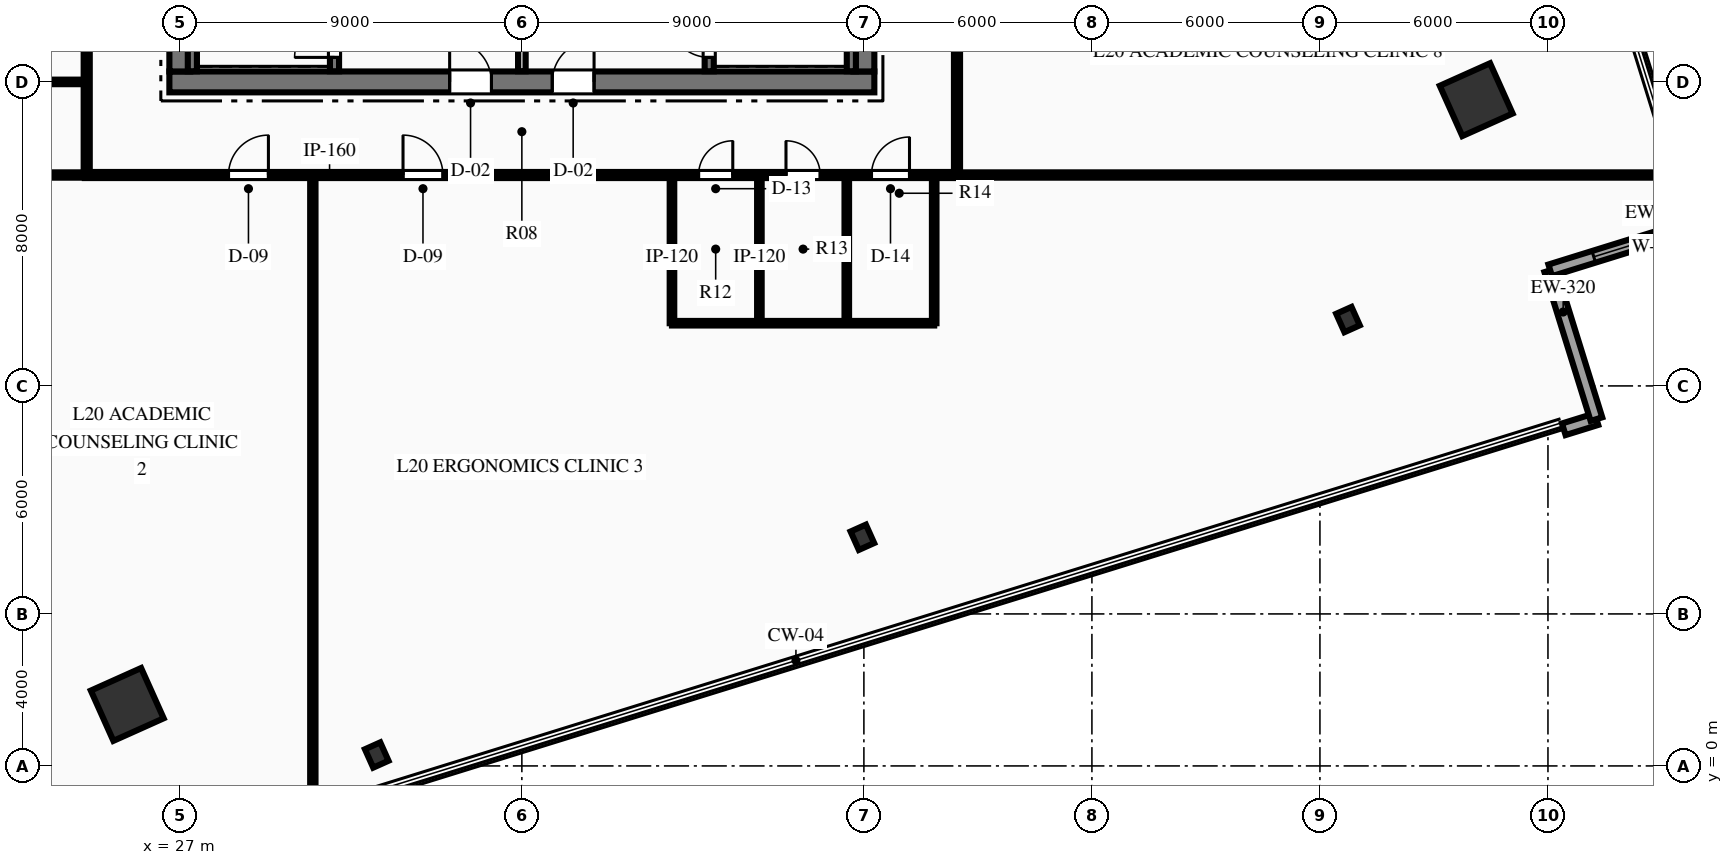
"""IFC4 building model, lengths in metres.
Left out: names, types, materials, properties, quantities, classifications, styles, units other than length and angle.
Written with IfcOpenShell. Run it as: python <this file> out.ifc"""

import sys

from ifc_helpers import new_model, si_unit, direction, frame, frame_2d, origin, origin_2d, place, context, subcontext, project, spatial, rectangle, hollow_rectangle, i_section, extrude, element, fill, save


model = new_model("IFC4")
c1 = context("Model", 3, precision=1e-05, world=origin(), true_north=direction((0.0, 1.0)))
c2 = subcontext(c1, "Body", "Model", "MODEL_VIEW")
j1 = project(units=[si_unit("LENGTHUNIT", "METRE"), si_unit("PLANEANGLEUNIT", "RADIAN")], contexts=[c1])
p1 = place(None, origin())
s1 = spatial("IfcSite", under=j1, at=p1, CompositionType="ELEMENT")
p2 = place(p1, origin())
s2 = spatial("IfcBuilding", under=s1, at=p2, CompositionType="ELEMENT")
p3 = place(p2, frame((0.0, 0.0, 85.95)))
s3 = spatial("IfcBuildingStorey", under=s2, at=p3, CompositionType="ELEMENT", Elevation=85.95)
p4 = place(p3, frame((26.725, 18.0, 0.0), z_axis=(0.0, 0.0, 1.0), x_axis=(1.0, 0.0, 0.0)))
e1 = element("IfcWall", 1, at=p4, inside=s3, PredefinedType="SHEAR", context=c2, shape_type="SweptSolid", body=[
    extrude(rectangle(XDim=18.55, YDim=0.55, at=frame_2d((9.275, 0.0))), origin(), (0.0, 0.0, 1.0), 4.5),
])
p5 = place(p4, frame((7.375, 0.0, 0.0)))
e2 = element("IfcOpeningElement", 2, at=p5, cuts=e1, PredefinedType="OPENING", context=c2, shape_type="SweptSolid", body=[
    extrude(rectangle(XDim=1.1, YDim=2.15, at=frame_2d((0.55, 1.075))), frame((0.0, 0.285, 0.0), z_axis=(0.0, -1.0, 0.0), x_axis=(1.0, 0.0, 0.0)), (0.0, 0.0, 1.0), 0.57),
])
p6 = place(p4, frame((10.075, 0.0, 0.0)))
e3 = element("IfcOpeningElement", 3, at=p6, cuts=e1, PredefinedType="OPENING", context=c2, shape_type="SweptSolid", body=[
    extrude(rectangle(XDim=1.1, YDim=2.15, at=frame_2d((0.55, 1.075))), frame((0.0, 0.285, 0.0), z_axis=(0.0, -1.0, 0.0), x_axis=(1.0, 0.0, 0.0)), (0.0, 0.0, 1.0), 0.57),
])
p7 = place(p3, frame((27.0, 18.275, 0.0), z_axis=(0.0, 0.0, 1.0), x_axis=(0.0, 1.0, 0.0)))
e4 = element("IfcWall", 4, at=p7, inside=s3, PredefinedType="SHEAR", context=c2, shape_type="SweptSolid", body=[
    extrude(rectangle(XDim=15.45, YDim=0.55, at=frame_2d((7.725, 0.0))), origin(), (0.0, 0.0, 1.0), 4.5),
])
p8 = place(p7, frame((9.965, 0.0, 0.0)))
e5 = element("IfcOpeningElement", 5, at=p8, cuts=e4, PredefinedType="OPENING", context=c2, shape_type="SweptSolid", body=[
    extrude(rectangle(XDim=1.4, YDim=2.2, at=frame_2d((0.7, 1.1))), frame((0.0, 0.285, 0.0), z_axis=(0.0, -1.0, 0.0), x_axis=(1.0, 0.0, 0.0)), (0.0, 0.0, 1.0), 0.57),
])
p9 = place(p3, frame((45.0, 18.275, 0.0), z_axis=(0.0, 0.0, 1.0), x_axis=(0.0, 1.0, 0.0)))
e6 = element("IfcWall", 6, at=p9, inside=s3, PredefinedType="SHEAR", context=c2, shape_type="SweptSolid", body=[
    extrude(rectangle(XDim=15.45, YDim=0.55, at=frame_2d((7.725, 0.0))), origin(), (0.0, 0.0, 1.0), 4.5),
])
p10 = place(p9, frame((9.965, 0.0, 0.0)))
e7 = element("IfcOpeningElement", 7, at=p10, cuts=e6, PredefinedType="OPENING", context=c2, shape_type="SweptSolid", body=[
    extrude(rectangle(XDim=1.4, YDim=2.2, at=frame_2d((0.7, 1.1))), frame((0.0, 0.285, 0.0), z_axis=(0.0, -1.0, 0.0), x_axis=(1.0, 0.0, 0.0)), (0.0, 0.0, 1.0), 0.57),
])
p11 = place(p3, frame((31.07, 18.28, 0.0), z_axis=(0.0, 0.0, 1.0), x_axis=(0.0, 1.0, 0.0)))
e8 = element("IfcWall", 8, at=p11, inside=s3, PredefinedType="SHEAR", context=c2, shape_type="SweptSolid", body=[
    extrude(rectangle(XDim=8.26, YDim=0.24, at=frame_2d((4.13, 0.0))), origin(), (0.0, 0.0, 1.0), 4.5),
])
p12 = place(p11, frame((0.365, 0.0, 0.0)))
e9 = element("IfcOpeningElement", 9, at=p12, cuts=e8, PredefinedType="OPENING", context=c2, shape_type="SweptSolid", body=[
    extrude(rectangle(XDim=1.05, YDim=2.15, at=frame_2d((0.525, 1.075))), frame((0.0, 0.13, 0.0), z_axis=(0.0, -1.0, 0.0), x_axis=(1.0, 0.0, 0.0)), (0.0, 0.0, 1.0), 0.26),
])
p13 = place(p3, frame((27.33, 18.28, 0.0), z_axis=(0.0, 0.0, 1.0), x_axis=(0.0, 1.0, 0.0)))
e10 = element("IfcWall", 10, at=p13, inside=s3, PredefinedType="SHEAR", context=c2, shape_type="SweptSolid", body=[
    extrude(rectangle(XDim=8.26, YDim=0.24, at=frame_2d((4.13, 0.0))), origin(), (0.0, 0.0, 1.0), 4.5),
])
p14 = place(p3, frame((40.93, 18.28, 0.0), z_axis=(0.0, 0.0, 1.0), x_axis=(0.0, 1.0, 0.0)))
e11 = element("IfcWall", 11, at=p14, inside=s3, PredefinedType="SHEAR", context=c2, shape_type="SweptSolid", body=[
    extrude(rectangle(XDim=8.26, YDim=0.24, at=frame_2d((4.13, 0.0))), origin(), (0.0, 0.0, 1.0), 4.5),
])
p15 = place(p14, frame((0.365, 0.0, 0.0)))
e12 = element("IfcOpeningElement", 12, at=p15, cuts=e11, PredefinedType="OPENING", context=c2, shape_type="SweptSolid", body=[
    extrude(rectangle(XDim=1.05, YDim=2.15, at=frame_2d((0.525, 1.075))), frame((0.0, 0.13, 0.0), z_axis=(0.0, -1.0, 0.0), x_axis=(1.0, 0.0, 0.0)), (0.0, 0.0, 1.0), 0.26),
])
p16 = place(p3, frame((44.67, 18.28, 0.0), z_axis=(0.0, 0.0, 1.0), x_axis=(0.0, 1.0, 0.0)))
e13 = element("IfcWall", 13, at=p16, inside=s3, PredefinedType="SHEAR", context=c2, shape_type="SweptSolid", body=[
    extrude(rectangle(XDim=8.26, YDim=0.24, at=frame_2d((4.13, 0.0))), origin(), (0.0, 0.0, 1.0), 4.5),
])
for number, where, z_axis, x_axis in (
    (14, (25.617, 1.618, 0.0), (0.0, 0.0, 1.0), (0.912, 0.409, 0.0)),
    (15, (61.112, 17.533, 0.0), (0.0, 0.0, 1.0), (0.912, 0.409, 0.0)),
):
    element("IfcColumn", number, at=place(p3, frame(where, z_axis=z_axis, x_axis=x_axis)), inside=s3, PredefinedType="COLUMN", context=c2, shape_type="SweptSolid", body=[
        extrude(hollow_rectangle(XDim=1.45, YDim=1.45, WallThickness=0.07, at=origin_2d()), origin(), (0.0, 0.0, 1.0), 4.5),
    ])
for number, where, z_axis, x_axis in (
    (16, (32.181, 0.287, 0.0), (0.0, 0.0, 1.0), (0.912, 0.409, 0.0)),
    (17, (44.96, 6.017, 0.0), (0.0, 0.0, 1.0), (0.912, 0.409, 0.0)),
    (18, (57.738, 11.746, 0.0), (0.0, 0.0, 1.0), (0.912, 0.409, 0.0)),
):
    element("IfcColumn", number, at=place(p3, frame(where, z_axis=z_axis, x_axis=x_axis)), inside=s3, PredefinedType="COLUMN", context=c2, shape_type="SweptSolid", body=[
        extrude(i_section(OverallWidth=0.442, OverallDepth=0.531, WebThickness=0.066, FlangeThickness=0.106, at=origin_2d()), origin(), (0.0, 0.0, 1.0), 4.5),
    ])
p17 = place(p3, frame((64.276, 9.126, 0.0), z_axis=(0.0, 0.0, 1.0), x_axis=(-0.954942240285, -0.296791707634, 0.0)))
e19 = element("IfcWall", 19, at=p17, inside=s3, PredefinedType="STANDARD", context=c2, shape_type="SweptSolid", body=[
    extrude(rectangle(XDim=0.9, YDim=0.32, at=frame_2d((0.45, 0.0))), origin(), (0.0, 0.0, 1.0), 4.2),
])
p18 = place(p3, frame((63.06, 13.042, 0.0), z_axis=(0.0, 0.0, 1.0), x_axis=(0.296545302379, -0.95501878706, 0.0)))
e20 = element("IfcWall", 20, at=p18, inside=s3, PredefinedType="STANDARD", context=c2, shape_type="SweptSolid", body=[
    extrude(rectangle(XDim=4.1, YDim=0.32, at=frame_2d((2.05, 0.0))), origin(), (0.0, 0.0, 1.0), 4.2),
])
p19 = place(p3, frame((66.976, 14.257, 0.0), z_axis=(0.0, 0.0, 1.0), x_axis=(-0.955024023145, -0.296528439134, 0.0)))
e21 = element("IfcWall", 21, at=p19, inside=s3, PredefinedType="STANDARD", context=c2, shape_type="SweptSolid", body=[
    extrude(rectangle(XDim=4.1, YDim=0.32, at=frame_2d((2.05, 0.0))), origin(), (0.0, 0.0, 1.0), 4.2),
])
p20 = place(p19, frame((1.2, 0.0, 0.75)))
e22 = element("IfcOpeningElement", 22, at=p20, cuts=e21, PredefinedType="OPENING", context=c2, shape_type="SweptSolid", body=[
    extrude(rectangle(XDim=1.7, YDim=2.5, at=frame_2d((0.85, 1.25))), frame((0.0, 0.17, 0.0), z_axis=(0.0, -1.0, 0.0), x_axis=(1.0, 0.0, 0.0)), (0.0, 0.0, 1.0), 0.34),
])
p21 = place(p3, frame((36.0, 18.28, 0.0), z_axis=(0.0, 0.0, 1.0), x_axis=(0.0, 1.0, 0.0)))
e23 = element("IfcWall", 23, at=p21, inside=s3, PredefinedType="PARTITIONING", context=c2, shape_type="SweptSolid", body=[
    extrude(rectangle(XDim=3.77, YDim=0.2, at=frame_2d((1.885, 0.0))), origin(), (0.0, 0.0, 1.0), 4.2),
])
p22 = place(p3, frame((24.5, 15.55, 0.0), z_axis=(0.0, 0.0, 1.0), x_axis=(1.0, 0.0, 0.0)))
e24 = element("IfcWall", 24, at=p22, inside=s3, PredefinedType="PARTITIONING", context=c2, shape_type="SweptSolid", body=[
    extrude(rectangle(XDim=23.0, YDim=0.16, at=frame_2d((11.5, 0.0))), origin(), (0.0, 0.0, 1.0), 4.2),
])
p23 = place(p22, frame((16.15, 0.0, 0.0)))
e25 = element("IfcOpeningElement", 25, at=p23, cuts=e24, PredefinedType="OPENING", context=c2, shape_type="SweptSolid", body=[
    extrude(rectangle(XDim=0.9, YDim=2.15, at=frame_2d((0.45, 1.075))), frame((0.0, 0.09, 0.0), z_axis=(0.0, -1.0, 0.0), x_axis=(1.0, 0.0, 0.0)), (0.0, 0.0, 1.0), 0.18),
])
p24 = place(p22, frame((18.45, 0.0, 0.0)))
e26 = element("IfcOpeningElement", 26, at=p24, cuts=e24, PredefinedType="OPENING", context=c2, shape_type="SweptSolid", body=[
    extrude(rectangle(XDim=0.9, YDim=2.15, at=frame_2d((0.45, 1.075))), frame((0.0, 0.09, 0.0), z_axis=(0.0, -1.0, 0.0), x_axis=(1.0, 0.0, 0.0)), (0.0, 0.0, 1.0), 0.18),
])
p25 = place(p22, frame((20.7, 0.0, 0.0)))
e27 = element("IfcOpeningElement", 27, at=p25, cuts=e24, PredefinedType="OPENING", context=c2, shape_type="SweptSolid", body=[
    extrude(rectangle(XDim=1.0, YDim=2.15, at=frame_2d((0.5, 1.075))), frame((0.0, 0.09, 0.0), z_axis=(0.0, -1.0, 0.0), x_axis=(1.0, 0.0, 0.0)), (0.0, 0.0, 1.0), 0.18),
])
p26 = place(p22, frame((3.781, 0.0, 0.0)))
e28 = element("IfcOpeningElement", 28, at=p26, cuts=e24, PredefinedType="OPENING", context=c2, shape_type="SweptSolid", body=[
    extrude(rectangle(XDim=1.05, YDim=2.15, at=frame_2d((0.525, 1.075))), frame((0.0, 0.09, 0.0), z_axis=(0.0, -1.0, 0.0), x_axis=(1.0, 0.0, 0.0)), (0.0, 0.0, 1.0), 0.18),
])
p27 = place(p22, frame((8.373, 0.0, 0.0)))
e29 = element("IfcOpeningElement", 29, at=p27, cuts=e24, PredefinedType="OPENING", context=c2, shape_type="SweptSolid", body=[
    extrude(rectangle(XDim=1.05, YDim=2.15, at=frame_2d((0.525, 1.075))), frame((0.0, 0.09, 0.0), z_axis=(0.0, -1.0, 0.0), x_axis=(1.0, 0.0, 0.0)), (0.0, 0.0, 1.0), 0.18),
])
p28 = place(p3, frame((24.55, 15.55, 0.0), z_axis=(0.0, 0.0, 1.0), x_axis=(0.0, 1.0, 0.0)))
e30 = element("IfcWall", 30, at=p28, inside=s3, PredefinedType="PARTITIONING", context=c2, shape_type="SweptSolid", body=[
    extrude(rectangle(XDim=20.9, YDim=0.16, at=frame_2d((10.45, 0.0))), origin(), (0.0, 0.0, 1.0), 4.2),
])
p29 = place(p28, frame((5.075, 0.0, 0.0)))
e31 = element("IfcOpeningElement", 31, at=p29, cuts=e30, PredefinedType="OPENING", context=c2, shape_type="SweptSolid", body=[
    extrude(rectangle(XDim=0.95, YDim=2.15, at=frame_2d((0.475, 1.075))), frame((0.0, 0.09, 0.0), z_axis=(0.0, -1.0, 0.0), x_axis=(1.0, 0.0, 0.0)), (0.0, 0.0, 1.0), 0.18),
])
p30 = place(p28, frame((12.524, 0.0, 0.0)))
e32 = element("IfcOpeningElement", 32, at=p30, cuts=e30, PredefinedType="OPENING", context=c2, shape_type="SweptSolid", body=[
    extrude(rectangle(XDim=1.05, YDim=2.15, at=frame_2d((0.525, 1.075))), frame((0.0, 0.09, 0.0), z_axis=(0.0, -1.0, 0.0), x_axis=(1.0, 0.0, 0.0)), (0.0, 0.0, 1.0), 0.18),
])
p31 = place(p3, frame((47.45, 15.55, 0.0), z_axis=(0.0, 0.0, 1.0), x_axis=(0.0, 1.0, 0.0)))
e33 = element("IfcWall", 33, at=p31, inside=s3, PredefinedType="PARTITIONING", context=c2, shape_type="SweptSolid", body=[
    extrude(rectangle(XDim=20.9, YDim=0.16, at=frame_2d((10.45, 0.0))), origin(), (0.0, 0.0, 1.0), 4.2),
])
p32 = place(p31, frame((4.087, 0.0, 0.0)))
e34 = element("IfcOpeningElement", 34, at=p32, cuts=e33, PredefinedType="OPENING", context=c2, shape_type="SweptSolid", body=[
    extrude(rectangle(XDim=1.05, YDim=2.15, at=frame_2d((0.525, 1.075))), frame((0.0, 0.09, 0.0), z_axis=(0.0, -1.0, 0.0), x_axis=(1.0, 0.0, 0.0)), (0.0, 0.0, 1.0), 0.18),
])
p33 = place(p31, frame((7.885, 0.0, 0.0)))
e35 = element("IfcOpeningElement", 35, at=p33, cuts=e33, PredefinedType="OPENING", context=c2, shape_type="SweptSolid", body=[
    extrude(rectangle(XDim=1.05, YDim=2.15, at=frame_2d((0.525, 1.075))), frame((0.0, 0.09, 0.0), z_axis=(0.0, -1.0, 0.0), x_axis=(1.0, 0.0, 0.0)), (0.0, 0.0, 1.0), 0.18),
])
p34 = place(p31, frame((14.743, 0.0, 0.0)))
e36 = element("IfcOpeningElement", 36, at=p34, cuts=e33, PredefinedType="OPENING", context=c2, shape_type="SweptSolid", body=[
    extrude(rectangle(XDim=1.05, YDim=2.15, at=frame_2d((0.525, 1.075))), frame((0.0, 0.09, 0.0), z_axis=(0.0, -1.0, 0.0), x_axis=(1.0, 0.0, 0.0)), (0.0, 0.0, 1.0), 0.18),
])
for number, where, z_axis, x_axis in (
    (37, (39.95, 11.65, 0.0), (0.0, 0.0, 1.0), (0.0, 1.0, 0.0)),
    (38, (42.25, 11.65, 0.0), (0.0, 0.0, 1.0), (0.0, 1.0, 0.0)),
    (39, (44.55, 11.65, 0.0), (0.0, 0.0, 1.0), (0.0, 1.0, 0.0)),
    (40, (46.85, 11.65, 0.0), (0.0, 0.0, 1.0), (0.0, 1.0, 0.0)),
):
    element("IfcWall", number, at=place(p3, frame(where, z_axis=z_axis, x_axis=x_axis)), inside=s3, PredefinedType="PARTITIONING", context=c2, shape_type="SweptSolid", body=[
        extrude(rectangle(XDim=3.9, YDim=0.12, at=frame_2d((1.95, 0.0))), origin(), (0.0, 0.0, 1.0), 4.2),
    ])
p35 = place(p3, frame((39.95, 11.65, 0.0), z_axis=(0.0, 0.0, 1.0), x_axis=(1.0, 0.0, 0.0)))
e41 = element("IfcWall", 41, at=p35, inside=s3, PredefinedType="PARTITIONING", context=c2, shape_type="SweptSolid", body=[
    extrude(rectangle(XDim=6.9, YDim=0.12, at=frame_2d((3.45, 0.0))), origin(), (0.0, 0.0, 1.0), 4.2),
])
p36 = place(p3, frame((11.958, 15.55, 0.0), z_axis=(0.0, 0.0, 1.0), x_axis=(1.0, 0.0, 0.0)))
e42 = element("IfcWall", 42, at=p36, inside=s3, PredefinedType="PARTITIONING", context=c2, shape_type="SweptSolid", body=[
    extrude(rectangle(XDim=12.593, YDim=0.14, at=frame_2d((6.296, 0.0))), origin(), (0.0, 0.0, 1.0), 4.2),
])
p37 = place(p36, frame((6.663, 0.0, 0.0)))
e43 = element("IfcOpeningElement", 43, at=p37, cuts=e42, PredefinedType="OPENING", context=c2, shape_type="SweptSolid", body=[
    extrude(rectangle(XDim=0.95, YDim=2.15, at=frame_2d((0.475, 1.075))), frame((0.0, 0.08, 0.0), z_axis=(0.0, -1.0, 0.0), x_axis=(1.0, 0.0, 0.0)), (0.0, 0.0, 1.0), 0.16),
])
p38 = place(p3, frame((47.45, 15.55, 0.0), z_axis=(0.0, 0.0, 1.0), x_axis=(1.0, 0.0, 0.0)))
e44 = element("IfcWall", 44, at=p38, inside=s3, PredefinedType="PARTITIONING", context=c2, shape_type="SweptSolid", body=[
    extrude(rectangle(XDim=19.082, YDim=0.14, at=frame_2d((9.541, 0.0))), origin(), (0.0, 0.0, 1.0), 4.2),
])
p39 = place(p3, frame((30.5, -1.32, 0.0), z_axis=(0.0, 0.0, 1.0), x_axis=(0.0, 1.0, 0.0)))
e45 = element("IfcWall", 45, at=p39, inside=s3, PredefinedType="PARTITIONING", context=c2, shape_type="SweptSolid", body=[
    extrude(rectangle(XDim=16.87, YDim=0.14, at=frame_2d((8.435, 0.0))), origin(), (0.0, 0.0, 1.0), 4.2),
])
p40 = place(p3, frame((20.2, 18.0, 0.0), z_axis=(0.0, 0.0, 1.0), x_axis=(1.0, 0.0, 0.0)))
e46 = element("IfcWall", 46, at=p40, inside=s3, PredefinedType="PARTITIONING", context=c2, shape_type="SweptSolid", body=[
    extrude(rectangle(XDim=4.35, YDim=0.12, at=frame_2d((2.175, 0.0))), origin(), (0.0, 0.0, 1.0), 3.499),
])
p41 = place(p20, origin())
e47 = element("IfcWindow", 47, at=p41, inside=s3, PartitioningType="SINGLE_PANEL", PredefinedType="WINDOW", context=c2, shape_type="SweptSolid", body=[
    extrude(rectangle(XDim=1.7, YDim=2.5, at=frame_2d((0.85, 1.25))), frame((0.0, 0.03, 0.0), z_axis=(0.0, -1.0, 0.0), x_axis=(1.0, 0.0, 0.0)), (0.0, 0.0, 1.0), 0.06),
])
fill(e22, e47)
p42 = place(p12, origin())
e48 = element("IfcDoor", 48, at=p42, inside=s3, OperationType="SINGLE_SWING_LEFT", PredefinedType="DOOR", context=c2, shape_type="SweptSolid", body=[
    extrude(rectangle(XDim=1.05, YDim=2.15, at=frame_2d((0.525, 1.075))), frame((0.0, 0.025, 0.0), z_axis=(0.0, -1.0, 0.0), x_axis=(1.0, 0.0, 0.0)), (0.0, 0.0, 1.0), 0.05),
])
fill(e9, e48)
p43 = place(p15, origin())
e49 = element("IfcDoor", 49, at=p43, inside=s3, OperationType="SINGLE_SWING_RIGHT", PredefinedType="DOOR", context=c2, shape_type="SweptSolid", body=[
    extrude(rectangle(XDim=1.05, YDim=2.15, at=frame_2d((0.525, 1.075))), frame((0.0, 0.025, 0.0), z_axis=(0.0, -1.0, 0.0), x_axis=(1.0, 0.0, 0.0)), (0.0, 0.0, 1.0), 0.05),
])
fill(e12, e49)
p44 = place(p5, origin())
e50 = element("IfcDoor", 50, at=p44, inside=s3, OperationType="SINGLE_SWING_LEFT", PredefinedType="DOOR", context=c2, shape_type="SweptSolid", body=[
    extrude(rectangle(XDim=1.1, YDim=2.15, at=frame_2d((0.55, 1.075))), frame((0.0, 0.025, 0.0), z_axis=(0.0, -1.0, 0.0), x_axis=(1.0, 0.0, 0.0)), (0.0, 0.0, 1.0), 0.05),
])
fill(e2, e50)
p45 = place(p6, origin())
e51 = element("IfcDoor", 51, at=p45, inside=s3, OperationType="SINGLE_SWING_RIGHT", PredefinedType="DOOR", context=c2, shape_type="SweptSolid", body=[
    extrude(rectangle(XDim=1.1, YDim=2.15, at=frame_2d((0.55, 1.075))), frame((0.0, 0.025, 0.0), z_axis=(0.0, -1.0, 0.0), x_axis=(1.0, 0.0, 0.0)), (0.0, 0.0, 1.0), 0.05),
])
fill(e3, e51)
p46 = place(p23, origin())
e52 = element("IfcDoor", 52, at=p46, inside=s3, OperationType="SINGLE_SWING_RIGHT", PredefinedType="DOOR", context=c2, shape_type="SweptSolid", body=[
    extrude(rectangle(XDim=0.9, YDim=2.15, at=frame_2d((0.45, 1.075))), frame((0.0, 0.025, 0.0), z_axis=(0.0, -1.0, 0.0), x_axis=(1.0, 0.0, 0.0)), (0.0, 0.0, 1.0), 0.05),
])
fill(e25, e52)
p47 = place(p24, origin())
e53 = element("IfcDoor", 53, at=p47, inside=s3, OperationType="SINGLE_SWING_LEFT", PredefinedType="DOOR", context=c2, shape_type="SweptSolid", body=[
    extrude(rectangle(XDim=0.9, YDim=2.15, at=frame_2d((0.45, 1.075))), frame((0.0, 0.025, 0.0), z_axis=(0.0, -1.0, 0.0), x_axis=(1.0, 0.0, 0.0)), (0.0, 0.0, 1.0), 0.05),
])
fill(e26, e53)
p48 = place(p25, origin())
e54 = element("IfcDoor", 54, at=p48, inside=s3, OperationType="SINGLE_SWING_RIGHT", PredefinedType="DOOR", context=c2, shape_type="SweptSolid", body=[
    extrude(rectangle(XDim=1.0, YDim=2.15, at=frame_2d((0.5, 1.075))), frame((0.0, 0.025, 0.0), z_axis=(0.0, -1.0, 0.0), x_axis=(1.0, 0.0, 0.0)), (0.0, 0.0, 1.0), 0.05),
])
fill(e27, e54)
p49 = place(p26, origin())
e55 = element("IfcDoor", 55, at=p49, inside=s3, OperationType="SINGLE_SWING_RIGHT", PredefinedType="DOOR", context=c2, shape_type="SweptSolid", body=[
    extrude(rectangle(XDim=1.05, YDim=2.15, at=frame_2d((0.525, 1.075))), frame((0.0, 0.025, 0.0), z_axis=(0.0, -1.0, 0.0), x_axis=(1.0, 0.0, 0.0)), (0.0, 0.0, 1.0), 0.05),
])
fill(e28, e55)
p50 = place(p27, origin())
e56 = element("IfcDoor", 56, at=p50, inside=s3, OperationType="SINGLE_SWING_LEFT", PredefinedType="DOOR", context=c2, shape_type="SweptSolid", body=[
    extrude(rectangle(XDim=1.05, YDim=2.15, at=frame_2d((0.525, 1.075))), frame((0.0, 0.025, 0.0), z_axis=(0.0, -1.0, 0.0), x_axis=(1.0, 0.0, 0.0)), (0.0, 0.0, 1.0), 0.05),
])
fill(e29, e56)
save(model, sys.argv[1])
